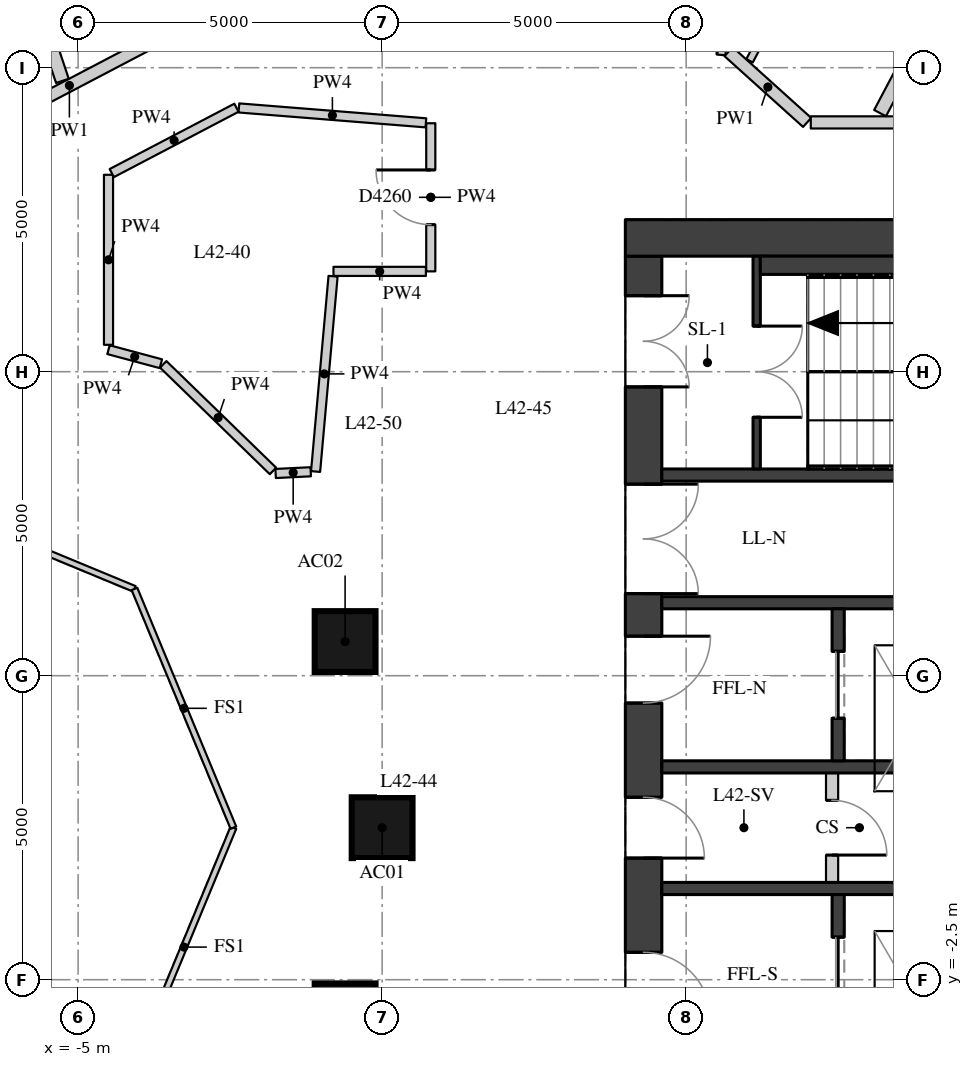
"""IFC4 building model, lengths in metres.
Left out: names, types, materials, properties, quantities, classifications, styles, units other than length and angle.
Written with IfcOpenShell. Run it as: python <this file> out.ifc"""

import sys

from ifc_helpers import new_model, si_unit, direction, frame, frame_2d, origin, origin_2d, place, context, subcontext, project, spatial, rectangle, extrude, element, fill, save


model = new_model("IFC4")
c1 = context("Model", 3, precision=1e-05, world=origin(), true_north=direction((0.0, 1.0)))
c2 = subcontext(c1, "Body", "Model", "MODEL_VIEW")
j1 = project(units=[si_unit("LENGTHUNIT", "METRE"), si_unit("PLANEANGLEUNIT", "RADIAN")], contexts=[c1])
p1 = place(None, origin())
s1 = spatial("IfcSite", under=j1, at=p1, CompositionType="ELEMENT")
p2 = place(p1, origin())
s2 = spatial("IfcBuilding", under=s1, at=p2, CompositionType="ELEMENT")
p3 = place(p2, frame((0.0, 0.0, 151.7)))
s3 = spatial("IfcBuildingStorey", under=s2, at=p3, CompositionType="ELEMENT", Elevation=151.7)
for number, where, z_axis, x_axis in (
    (1, (0.0, 0.0, 0.0), (0.0, 0.0, 1.0), (1.0, 0.0, 0.0)),
    (2, (-0.609, 3.062, 0.0), (0.0, 0.0, 1.0), (1.0, 0.0, 0.0)),
    (3, (-0.609, -3.062, 0.0), (0.0, 0.0, 1.0), (1.0, 0.0, 0.0)),
):
    element("IfcColumn", number, at=place(p3, frame(where, z_axis=z_axis, x_axis=x_axis)), inside=s3, PredefinedType="COLUMN", context=c2, shape_type="SweptSolid", body=[
        extrude(rectangle(XDim=1.0, YDim=1.0, at=origin_2d()), origin(), (0.0, 0.0, 1.0), 3.3),
    ])
p4 = place(p3, frame((4.3, -9.4, 0.0), z_axis=(0.0, 0.0, 1.0), x_axis=(0.0, 1.0, 0.0)))
e4 = element("IfcWall", 4, at=p4, inside=s3, PredefinedType="SHEAR", context=c2, shape_type="SweptSolid", body=[
    extrude(rectangle(XDim=18.8, YDim=0.6, at=frame_2d((9.4, 0.0))), origin(), (0.0, 0.0, 1.0), 3.02),
])
p5 = place(p4, frame((0.65, 0.0, 0.0)))
e5 = element("IfcOpeningElement", 5, at=p5, cuts=e4, PredefinedType="OPENING", context=c2, shape_type="SweptSolid", body=[
    extrude(rectangle(XDim=1.5, YDim=2.1, at=frame_2d((0.75, 1.05))), frame((0.0, 0.31, 0.0), z_axis=(0.0, -1.0, 0.0), x_axis=(1.0, 0.0, 0.0)), (0.0, 0.0, 1.0), 0.62),
])
p6 = place(p4, frame((3.75, 0.0, 0.0)))
e6 = element("IfcOpeningElement", 6, at=p6, cuts=e4, PredefinedType="OPENING", context=c2, shape_type="SweptSolid", body=[
    extrude(rectangle(XDim=1.8, YDim=2.1, at=frame_2d((0.9, 1.05))), frame((0.0, 0.31, 0.0), z_axis=(0.0, -1.0, 0.0), x_axis=(1.0, 0.0, 0.0)), (0.0, 0.0, 1.0), 0.62),
])
p7 = place(p4, frame((6.25, 0.0, 0.0)))
e7 = element("IfcOpeningElement", 7, at=p7, cuts=e4, PredefinedType="OPENING", context=c2, shape_type="SweptSolid", body=[
    extrude(rectangle(XDim=1.1, YDim=2.1, at=frame_2d((0.55, 1.05))), frame((0.0, 0.31, 0.0), z_axis=(0.0, -1.0, 0.0), x_axis=(1.0, 0.0, 0.0)), (0.0, 0.0, 1.0), 0.62),
])
p8 = place(p4, frame((8.9, 0.0, 0.0)))
e8 = element("IfcOpeningElement", 8, at=p8, cuts=e4, PredefinedType="OPENING", context=c2, shape_type="SweptSolid", body=[
    extrude(rectangle(XDim=1.0, YDim=2.1, at=frame_2d((0.5, 1.05))), frame((0.0, 0.31, 0.0), z_axis=(0.0, -1.0, 0.0), x_axis=(1.0, 0.0, 0.0)), (0.0, 0.0, 1.0), 0.62),
])
p9 = place(p4, frame((11.45, 0.0, 0.0)))
e9 = element("IfcOpeningElement", 9, at=p9, cuts=e4, PredefinedType="OPENING", context=c2, shape_type="SweptSolid", body=[
    extrude(rectangle(XDim=1.1, YDim=2.1, at=frame_2d((0.55, 1.05))), frame((0.0, 0.31, 0.0), z_axis=(0.0, -1.0, 0.0), x_axis=(1.0, 0.0, 0.0)), (0.0, 0.0, 1.0), 0.62),
])
p10 = place(p4, frame((13.25, 0.0, 0.0)))
e10 = element("IfcOpeningElement", 10, at=p10, cuts=e4, PredefinedType="OPENING", context=c2, shape_type="SweptSolid", body=[
    extrude(rectangle(XDim=1.8, YDim=2.1, at=frame_2d((0.9, 1.05))), frame((0.0, 0.31, 0.0), z_axis=(0.0, -1.0, 0.0), x_axis=(1.0, 0.0, 0.0)), (0.0, 0.0, 1.0), 0.62),
])
p11 = place(p4, frame((16.65, 0.0, 0.0)))
e11 = element("IfcOpeningElement", 11, at=p11, cuts=e4, PredefinedType="OPENING", context=c2, shape_type="SweptSolid", body=[
    extrude(rectangle(XDim=1.5, YDim=2.1, at=frame_2d((0.75, 1.05))), frame((0.0, 0.31, 0.0), z_axis=(0.0, -1.0, 0.0), x_axis=(1.0, 0.0, 0.0)), (0.0, 0.0, 1.0), 0.62),
])
p12 = place(p3, frame((4.0, 9.7, 0.0), z_axis=(0.0, 0.0, 1.0), x_axis=(1.0, 0.0, 0.0)))
e12 = element("IfcWall", 12, at=p12, inside=s3, PredefinedType="SHEAR", context=c2, shape_type="SweptSolid", body=[
    extrude(rectangle(XDim=12.0, YDim=0.6, at=frame_2d((6.0, 0.0))), origin(), (0.0, 0.0, 1.0), 3.02),
])
p13 = place(p3, frame((4.6, 5.8, 0.0), z_axis=(0.0, 0.0, 1.0), x_axis=(1.0, 0.0, 0.0)))
e13 = element("IfcWall", 13, at=p13, inside=s3, PredefinedType="SHEAR", context=c2, shape_type="SweptSolid", body=[
    extrude(rectangle(XDim=10.8, YDim=0.2, at=frame_2d((5.4, 0.0))), origin(), (0.0, 0.0, 1.0), 3.02),
])
p14 = place(p13, frame((7.05, 0.0, 0.0)))
e14 = element("IfcOpeningElement", 14, at=p14, cuts=e13, PredefinedType="OPENING", context=c2, shape_type="SweptSolid", body=[
    extrude(rectangle(XDim=1.1, YDim=2.1, at=frame_2d((0.55, 1.05))), frame((0.0, 0.11, 0.0), z_axis=(0.0, -1.0, 0.0), x_axis=(1.0, 0.0, 0.0)), (0.0, 0.0, 1.0), 0.22),
])
p15 = place(p13, frame((9.05, 0.0, 0.0)))
e15 = element("IfcOpeningElement", 15, at=p15, cuts=e13, PredefinedType="OPENING", context=c2, shape_type="SweptSolid", body=[
    extrude(rectangle(XDim=1.1, YDim=2.1, at=frame_2d((0.55, 1.05))), frame((0.0, 0.11, 0.0), z_axis=(0.0, -1.0, 0.0), x_axis=(1.0, 0.0, 0.0)), (0.0, 0.0, 1.0), 0.22),
])
p16 = place(p3, frame((4.6, 3.7, 0.0), z_axis=(0.0, 0.0, 1.0), x_axis=(1.0, 0.0, 0.0)))
e16 = element("IfcWall", 16, at=p16, inside=s3, PredefinedType="SHEAR", context=c2, shape_type="SweptSolid", body=[
    extrude(rectangle(XDim=10.8, YDim=0.2, at=frame_2d((5.4, 0.0))), origin(), (0.0, 0.0, 1.0), 3.02),
])
p17 = place(p16, frame((6.6, 0.0, 0.0)))
e17 = element("IfcOpeningElement", 17, at=p17, cuts=e16, PredefinedType="OPENING", context=c2, shape_type="SweptSolid", body=[
    extrude(rectangle(XDim=1.1, YDim=2.1, at=frame_2d((0.55, 1.05))), frame((0.0, 0.11, 0.0), z_axis=(0.0, -1.0, 0.0), x_axis=(1.0, 0.0, 0.0)), (0.0, 0.0, 1.0), 0.22),
])
p18 = place(p16, frame((8.9, 0.0, 0.0)))
e18 = element("IfcOpeningElement", 18, at=p18, cuts=e16, PredefinedType="OPENING", context=c2, shape_type="SweptSolid", body=[
    extrude(rectangle(XDim=1.1, YDim=2.1, at=frame_2d((0.55, 1.05))), frame((0.0, 0.11, 0.0), z_axis=(0.0, -1.0, 0.0), x_axis=(1.0, 0.0, 0.0)), (0.0, 0.0, 1.0), 0.22),
])
for number, where, z_axis, x_axis in (
    (19, (4.6, 1.0, 0.0), (0.0, 0.0, 1.0), (1.0, 0.0, 0.0)),
    (20, (4.6, -1.0, 0.0), (0.0, 0.0, 1.0), (1.0, 0.0, 0.0)),
):
    element("IfcWall", number, at=place(p3, frame(where, z_axis=z_axis, x_axis=x_axis)), inside=s3, PredefinedType="SHEAR", context=c2, shape_type="SweptSolid", body=[
        extrude(rectangle(XDim=10.8, YDim=0.2, at=frame_2d((5.4, 0.0))), origin(), (0.0, 0.0, 1.0), 3.02),
    ])
p19 = place(p3, frame((7.5, 1.1, 0.0), z_axis=(0.0, 0.0, 1.0), x_axis=(0.0, 1.0, 0.0)))
e21 = element("IfcWall", 21, at=p19, inside=s3, PredefinedType="SHEAR", context=c2, shape_type="SweptSolid", body=[
    extrude(rectangle(XDim=2.5, YDim=0.2, at=frame_2d((1.25, 0.0))), origin(), (0.0, 0.0, 1.0), 3.02),
])
p20 = place(p19, frame((0.7, 0.0, 0.0)))
e22 = element("IfcOpeningElement", 22, at=p20, cuts=e21, PredefinedType="OPENING", context=c2, shape_type="SweptSolid", body=[
    extrude(rectangle(XDim=1.1, YDim=2.1, at=frame_2d((0.55, 1.05))), frame((0.0, 0.11, 0.0), z_axis=(0.0, -1.0, 0.0), x_axis=(1.0, 0.0, 0.0)), (0.0, 0.0, 1.0), 0.22),
])
p21 = place(p3, frame((7.5, -3.6, 0.0), z_axis=(0.0, 0.0, 1.0), x_axis=(0.0, 1.0, 0.0)))
e23 = element("IfcWall", 23, at=p21, inside=s3, PredefinedType="SHEAR", context=c2, shape_type="SweptSolid", body=[
    extrude(rectangle(XDim=2.5, YDim=0.2, at=frame_2d((1.25, 0.0))), origin(), (0.0, 0.0, 1.0), 3.02),
])
p22 = place(p21, frame((0.7, 0.0, 0.0)))
e24 = element("IfcOpeningElement", 24, at=p22, cuts=e23, PredefinedType="OPENING", context=c2, shape_type="SweptSolid", body=[
    extrude(rectangle(XDim=1.1, YDim=2.1, at=frame_2d((0.55, 1.05))), frame((0.0, 0.11, 0.0), z_axis=(0.0, -1.0, 0.0), x_axis=(1.0, 0.0, 0.0)), (0.0, 0.0, 1.0), 0.22),
])
p23 = place(p3, frame((6.16, 5.9, 0.0), z_axis=(0.0, 0.0, 1.0), x_axis=(0.0, 1.0, 0.0)))
e25 = element("IfcWall", 25, at=p23, inside=s3, PredefinedType="SHEAR", context=c2, shape_type="SweptSolid", body=[
    extrude(rectangle(XDim=3.5, YDim=0.12, at=frame_2d((1.75, 0.0))), origin(), (0.0, 0.0, 1.0), 3.02),
])
p24 = place(p23, frame((0.85, 0.0, 0.0)))
e26 = element("IfcOpeningElement", 26, at=p24, cuts=e25, PredefinedType="OPENING", context=c2, shape_type="SweptSolid", body=[
    extrude(rectangle(XDim=1.5, YDim=2.1, at=frame_2d((0.75, 1.05))), frame((0.0, 0.07, 0.0), z_axis=(0.0, -1.0, 0.0), x_axis=(1.0, 0.0, 0.0)), (0.0, 0.0, 1.0), 0.14),
])
p25 = place(p3, frame((7.4, -0.9, 0.0), z_axis=(0.0, 0.0, 1.0), x_axis=(0.0, 1.0, 0.0)))
e27 = element("IfcWall", 27, at=p25, inside=s3, PredefinedType="PARTITIONING", context=c2, shape_type="SweptSolid", body=[
    extrude(rectangle(XDim=1.8, YDim=0.2, at=frame_2d((0.9, 0.0))), origin(), (0.0, 0.0, 1.0), 3.02),
])
p26 = place(p25, frame((0.45, 0.0, 0.0)))
e28 = element("IfcOpeningElement", 28, at=p26, cuts=e27, PredefinedType="OPENING", context=c2, shape_type="SweptSolid", body=[
    extrude(rectangle(XDim=0.9, YDim=2.1, at=frame_2d((0.45, 1.05))), frame((0.0, 0.11, 0.0), z_axis=(0.0, -1.0, 0.0), x_axis=(1.0, 0.0, 0.0)), (0.0, 0.0, 1.0), 0.22),
])
p27 = place(p3, frame((6.22, 9.25, 0.0), z_axis=(0.0, 0.0, 1.0), x_axis=(1.0, 0.0, 0.0)))
e29 = element("IfcWall", 29, at=p27, inside=s3, PredefinedType="PARTITIONING", context=c2, shape_type="SweptSolid", body=[
    extrude(rectangle(XDim=4.88, YDim=0.3, at=frame_2d((2.44, 0.0))), origin(), (0.0, 0.0, 1.0), 3.02),
])
p28 = place(p3, frame((-7.557, 10.942, 0.0), z_axis=(0.0, 0.0, 1.0), x_axis=(0.885672830659, 0.464309850244, 0.0)))
e30 = element("IfcWall", 30, at=p28, inside=s3, PredefinedType="PARTITIONING", context=c2, shape_type="SweptSolid", body=[
    extrude(rectangle(XDim=5.452, YDim=0.2, at=frame_2d((2.726, 0.0))), origin(), (0.0, 0.0, 1.0), 3.02),
])
p29 = place(p3, frame((-2.669, 13.468, 0.0), z_axis=(0.0, 0.0, 1.0), x_axis=(0.996831622407, -0.079540659849, 0.0)))
e31 = element("IfcWall", 31, at=p29, inside=s3, PredefinedType="PARTITIONING", context=c2, shape_type="SweptSolid", body=[
    extrude(rectangle(XDim=8.349, YDim=0.2, at=frame_2d((4.174, 0.0))), origin(), (0.0, 0.0, 1.0), 3.02),
])
p30 = place(p29, frame((7.109, 0.0, 0.0)))
e32 = element("IfcOpeningElement", 32, at=p30, cuts=e31, PredefinedType="OPENING", context=c2, shape_type="SweptSolid", body=[
    extrude(rectangle(XDim=1.1, YDim=2.1, at=frame_2d((0.55, 1.05))), frame((0.0, 0.11, 0.0), z_axis=(0.0, -1.0, 0.0), x_axis=(1.0, 0.0, 0.0)), (0.0, 0.0, 1.0), 0.22),
])
p31 = place(p29, frame((1.775, 0.0, 0.0)))
e33 = element("IfcOpeningElement", 33, at=p31, cuts=e31, PredefinedType="OPENING", context=c2, shape_type="SweptSolid", body=[
    extrude(rectangle(XDim=1.8, YDim=2.1, at=frame_2d((0.9, 1.05))), frame((0.0, 0.11, 0.0), z_axis=(0.0, -1.0, 0.0), x_axis=(1.0, 0.0, 0.0)), (0.0, 0.0, 1.0), 0.22),
])
p32 = place(p3, frame((5.698, 12.764, 0.0), z_axis=(0.0, 0.0, 1.0), x_axis=(0.742944876657, -0.669352605321, 0.0)))
e34 = element("IfcWall", 34, at=p32, inside=s3, PredefinedType="PARTITIONING", context=c2, shape_type="SweptSolid", body=[
    extrude(rectangle(XDim=1.738, YDim=0.2, at=frame_2d((0.869, 0.0))), origin(), (0.0, 0.0, 1.0), 3.02),
])
p33 = place(p3, frame((7.05, 11.6, 0.0), z_axis=(0.0, 0.0, 1.0), x_axis=(1.0, 0.0, 0.0)))
e35 = element("IfcWall", 35, at=p33, inside=s3, PredefinedType="PARTITIONING", context=c2, shape_type="SweptSolid", body=[
    extrude(rectangle(XDim=10.551, YDim=0.2, at=frame_2d((5.275, 0.0))), origin(), (0.0, 0.0, 1.0), 3.02),
])
p34 = place(p33, frame((2.264, 0.0, 0.0)))
e36 = element("IfcOpeningElement", 36, at=p34, cuts=e35, PredefinedType="OPENING", context=c2, shape_type="SweptSolid", body=[
    extrude(rectangle(XDim=0.9, YDim=2.1, at=frame_2d((0.45, 1.05))), frame((0.0, 0.11, 0.0), z_axis=(0.0, -1.0, 0.0), x_axis=(1.0, 0.0, 0.0)), (0.0, 0.0, 1.0), 0.22),
])
p35 = place(p33, frame((6.553, 0.0, 0.0)))
e37 = element("IfcOpeningElement", 37, at=p35, cuts=e35, PredefinedType="OPENING", context=c2, shape_type="SweptSolid", body=[
    extrude(rectangle(XDim=1.8, YDim=2.1, at=frame_2d((0.9, 1.05))), frame((0.0, 0.11, 0.0), z_axis=(0.0, -1.0, 0.0), x_axis=(1.0, 0.0, 0.0)), (0.0, 0.0, 1.0), 0.22),
])
p36 = place(p3, frame((0.8, 11.586, 0.0), z_axis=(0.0, 0.0, 1.0), x_axis=(0.0, -1.0, 0.0)))
e38 = element("IfcWall", 38, at=p36, inside=s3, PredefinedType="PARTITIONING", context=c2, shape_type="SweptSolid", body=[
    extrude(rectangle(XDim=2.436, YDim=0.15, at=frame_2d((1.218, 0.0))), origin(), (0.0, 0.0, 1.0), 3.02),
])
p37 = place(p36, frame((0.768, 0.0, 0.0)))
e39 = element("IfcOpeningElement", 39, at=p37, cuts=e38, PredefinedType="OPENING", context=c2, shape_type="SweptSolid", body=[
    extrude(rectangle(XDim=0.9, YDim=2.1, at=frame_2d((0.45, 1.05))), frame((0.0, 0.085, 0.0), z_axis=(0.0, -1.0, 0.0), x_axis=(1.0, 0.0, 0.0)), (0.0, 0.0, 1.0), 0.17),
])
p38 = place(p3, frame((0.72, 9.15, 0.0), z_axis=(0.0, 0.0, 1.0), x_axis=(-1.0, 0.0, 0.0)))
e40 = element("IfcWall", 40, at=p38, inside=s3, PredefinedType="PARTITIONING", context=c2, shape_type="SweptSolid", body=[
    extrude(rectangle(XDim=1.52, YDim=0.15, at=frame_2d((0.76, 0.0))), origin(), (0.0, 0.0, 1.0), 3.02),
])
p39 = place(p3, frame((-0.807, 9.07, 0.0), z_axis=(0.0, 0.0, 1.0), x_axis=(-0.089184087733, -0.996015159772, 0.0)))
e41 = element("IfcWall", 41, at=p39, inside=s3, PredefinedType="PARTITIONING", context=c2, shape_type="SweptSolid", body=[
    extrude(rectangle(XDim=3.225, YDim=0.15, at=frame_2d((1.612, 0.0))), origin(), (0.0, 0.0, 1.0), 3.02),
])
p40 = place(p3, frame((-1.175, 5.854, 0.0), z_axis=(0.0, 0.0, 1.0), x_axis=(-0.998798267986, -0.049010405705, 0.0)))
e42 = element("IfcWall", 42, at=p40, inside=s3, PredefinedType="PARTITIONING", context=c2, shape_type="SweptSolid", body=[
    extrude(rectangle(XDim=0.578, YDim=0.15, at=frame_2d((0.289, 0.0))), origin(), (0.0, 0.0, 1.0), 3.02),
])
p41 = place(p3, frame((-1.795, 5.867, 0.0), z_axis=(0.0, 0.0, 1.0), x_axis=(-0.717315398231, 0.696748605639, 0.0)))
e43 = element("IfcWall", 43, at=p41, inside=s3, PredefinedType="PARTITIONING", context=c2, shape_type="SweptSolid", body=[
    extrude(rectangle(XDim=2.517, YDim=0.15, at=frame_2d((1.258, 0.0))), origin(), (0.0, 0.0, 1.0), 3.02),
])
p42 = place(p3, frame((-3.639, 7.631, 0.0), z_axis=(0.0, 0.0, 1.0), x_axis=(-0.965879594242, 0.258991523853, 0.0)))
e44 = element("IfcWall", 44, at=p42, inside=s3, PredefinedType="PARTITIONING", context=c2, shape_type="SweptSolid", body=[
    extrude(rectangle(XDim=0.892, YDim=0.15, at=frame_2d((0.446, 0.0))), origin(), (0.0, 0.0, 1.0), 3.02),
])
p43 = place(p3, frame((-4.5, 7.942, 0.0), z_axis=(0.0, 0.0, 1.0), x_axis=(0.0, 1.0, 0.0)))
e45 = element("IfcWall", 45, at=p43, inside=s3, PredefinedType="PARTITIONING", context=c2, shape_type="SweptSolid", body=[
    extrude(rectangle(XDim=2.796, YDim=0.15, at=frame_2d((1.398, 0.0))), origin(), (0.0, 0.0, 1.0), 3.02),
])
p44 = place(p3, frame((-4.447, 10.766, 0.0), z_axis=(0.0, 0.0, 1.0), x_axis=(0.885701482048, 0.464255193507, 0.0)))
e46 = element("IfcWall", 46, at=p44, inside=s3, PredefinedType="PARTITIONING", context=c2, shape_type="SweptSolid", body=[
    extrude(rectangle(XDim=2.315, YDim=0.15, at=frame_2d((1.158, 0.0))), origin(), (0.0, 0.0, 1.0), 3.02),
])
p45 = place(p3, frame((-2.356, 11.838, 0.0), z_axis=(0.0, 0.0, 1.0), x_axis=(0.996845649151, -0.079364675829, 0.0)))
e47 = element("IfcWall", 47, at=p45, inside=s3, PredefinedType="PARTITIONING", context=c2, shape_type="SweptSolid", body=[
    extrude(rectangle(XDim=3.085, YDim=0.15, at=frame_2d((1.543, 0.0))), origin(), (0.0, 0.0, 1.0), 3.02),
])
p46 = place(p3, frame((10.865, 16.806, 0.0), z_axis=(0.0, 0.0, 1.0), x_axis=(-0.468046615648, -0.883703777054, 0.0)))
e48 = element("IfcWall", 48, at=p46, inside=s3, PredefinedType="PARTITIONING", context=c2, shape_type="SweptSolid", body=[
    extrude(rectangle(XDim=5.718, YDim=0.22, at=frame_2d((2.859, 0.0))), origin(), (0.0, 0.0, 1.0), 3.02),
])
p47 = place(p3, frame((-7.683, 19.545, 0.0), z_axis=(0.0, 0.0, 1.0), x_axis=(0.316706037399, -0.94852374028, 0.0)))
e49 = element("IfcWall", 49, at=p47, inside=s3, PredefinedType="PARTITIONING", context=c2, shape_type="SweptSolid", body=[
    extrude(rectangle(XDim=7.656, YDim=0.22, at=frame_2d((3.828, 0.0))), origin(), (0.0, 0.0, 1.0), 3.02),
])
p48 = place(p3, frame((6.042, 12.614, 0.0), z_axis=(0.0, 0.0, 1.0), x_axis=(0.46804844257, 0.883702809438, 0.0)))
e50 = element("IfcWall", 50, at=p48, inside=s3, PredefinedType="PARTITIONING", context=c2, shape_type="SweptSolid", body=[
    extrude(rectangle(XDim=3.071, YDim=0.12, at=frame_2d((1.535, 0.0))), origin(), (0.0, 0.0, 1.0), 3.02),
])
for number, where, z_axis, x_axis in (
    (51, (-2.446, 0.0, 0.0), (0.0, 0.0, 1.0), (-0.383, -0.924, 0.0)),
    (52, (-8.0, 5.554, 0.0), (0.0, 0.0, 1.0), (0.924, -0.383, 0.0)),
    (53, (-4.073, 3.927, 0.0), (0.0, 0.0, 1.0), (0.383, -0.924, 0.0)),
):
    element("IfcWall", number, at=place(p3, frame(where, z_axis=z_axis, x_axis=x_axis)), inside=s3, PredefinedType="PARTITIONING", context=c2, shape_type="SweptSolid", body=[
        extrude(rectangle(XDim=4.251, YDim=0.1, at=frame_2d((2.125, 0.0))), origin(), (0.0, 0.0, 1.0), 3.02),
    ])
p49 = place(p7, origin())
e54 = element("IfcDoor", 54, at=p49, inside=s3, OperationType="SINGLE_SWING_RIGHT", PredefinedType="DOOR", context=c2, shape_type="SweptSolid", body=[
    extrude(rectangle(XDim=1.1, YDim=2.1, at=frame_2d((0.55, 1.05))), frame((0.0, 0.025, 0.0), z_axis=(0.0, -1.0, 0.0), x_axis=(1.0, 0.0, 0.0)), (0.0, 0.0, 1.0), 0.05),
])
fill(e7, e54)
p50 = place(p8, origin())
e55 = element("IfcDoor", 55, at=p50, inside=s3, OperationType="SINGLE_SWING_RIGHT", PredefinedType="DOOR", context=c2, shape_type="SweptSolid", body=[
    extrude(rectangle(XDim=1.0, YDim=2.1, at=frame_2d((0.5, 1.05))), frame((0.0, 0.025, 0.0), z_axis=(0.0, -1.0, 0.0), x_axis=(1.0, 0.0, 0.0)), (0.0, 0.0, 1.0), 0.05),
])
fill(e8, e55)
p51 = place(p9, origin())
e56 = element("IfcDoor", 56, at=p51, inside=s3, OperationType="SINGLE_SWING_LEFT", PredefinedType="DOOR", context=c2, shape_type="SweptSolid", body=[
    extrude(rectangle(XDim=1.1, YDim=2.1, at=frame_2d((0.55, 1.05))), frame((0.0, 0.025, 0.0), z_axis=(0.0, -1.0, 0.0), x_axis=(1.0, 0.0, 0.0)), (0.0, 0.0, 1.0), 0.05),
])
fill(e9, e56)
p52 = place(p10, origin())
e57 = element("IfcDoor", 57, at=p52, inside=s3, OperationType="DOUBLE_DOOR_SINGLE_SWING", PredefinedType="DOOR", context=c2, shape_type="SweptSolid", body=[
    extrude(rectangle(XDim=1.8, YDim=2.1, at=frame_2d((0.9, 1.05))), frame((0.0, 0.025, 0.0), z_axis=(0.0, -1.0, 0.0), x_axis=(1.0, 0.0, 0.0)), (0.0, 0.0, 1.0), 0.05),
])
fill(e10, e57)
p53 = place(p11, origin())
e58 = element("IfcDoor", 58, at=p53, inside=s3, OperationType="DOUBLE_DOOR_SINGLE_SWING", PredefinedType="DOOR", context=c2, shape_type="SweptSolid", body=[
    extrude(rectangle(XDim=1.5, YDim=2.1, at=frame_2d((0.75, 1.05))), frame((0.0, 0.025, 0.0), z_axis=(0.0, -1.0, 0.0), x_axis=(1.0, 0.0, 0.0)), (0.0, 0.0, 1.0), 0.05),
])
fill(e11, e58)
p54 = place(p24, origin())
e59 = element("IfcDoor", 59, at=p54, inside=s3, OperationType="DOUBLE_DOOR_SINGLE_SWING", PredefinedType="DOOR", context=c2, shape_type="SweptSolid", body=[
    extrude(rectangle(XDim=1.5, YDim=2.1, at=frame_2d((0.75, 1.05))), frame((0.0, 0.025, 0.0), z_axis=(0.0, -1.0, 0.0), x_axis=(1.0, 0.0, 0.0)), (0.0, 0.0, 1.0), 0.05),
])
fill(e26, e59)
p55 = place(p20, origin())
e60 = element("IfcDoor", 60, at=p55, inside=s3, OperationType="DOUBLE_DOOR_SLIDING", PredefinedType="DOOR", context=c2, shape_type="SweptSolid", body=[
    extrude(rectangle(XDim=1.1, YDim=2.1, at=frame_2d((0.55, 1.05))), frame((0.0, 0.025, 0.0), z_axis=(0.0, -1.0, 0.0), x_axis=(1.0, 0.0, 0.0)), (0.0, 0.0, 1.0), 0.05),
])
fill(e22, e60)
p56 = place(p22, origin())
e61 = element("IfcDoor", 61, at=p56, inside=s3, OperationType="DOUBLE_DOOR_SLIDING", PredefinedType="DOOR", context=c2, shape_type="SweptSolid", body=[
    extrude(rectangle(XDim=1.1, YDim=2.1, at=frame_2d((0.55, 1.05))), frame((0.0, 0.025, 0.0), z_axis=(0.0, -1.0, 0.0), x_axis=(1.0, 0.0, 0.0)), (0.0, 0.0, 1.0), 0.05),
])
fill(e24, e61)
p57 = place(p26, origin())
e62 = element("IfcDoor", 62, at=p57, inside=s3, OperationType="SINGLE_SWING_RIGHT", PredefinedType="DOOR", context=c2, shape_type="SweptSolid", body=[
    extrude(rectangle(XDim=0.9, YDim=2.1, at=frame_2d((0.45, 1.05))), frame((0.0, 0.025, 0.0), z_axis=(0.0, -1.0, 0.0), x_axis=(1.0, 0.0, 0.0)), (0.0, 0.0, 1.0), 0.05),
])
fill(e28, e62)
p58 = place(p37, origin())
e63 = element("IfcDoor", 63, at=p58, inside=s3, OperationType="SINGLE_SWING_RIGHT", PredefinedType="DOOR", context=c2, shape_type="SweptSolid", body=[
    extrude(rectangle(XDim=0.9, YDim=2.1, at=frame_2d((0.45, 1.05))), frame((0.0, 0.025, 0.0), z_axis=(0.0, -1.0, 0.0), x_axis=(1.0, 0.0, 0.0)), (0.0, 0.0, 1.0), 0.05),
])
fill(e39, e63)
save(model, sys.argv[1])
